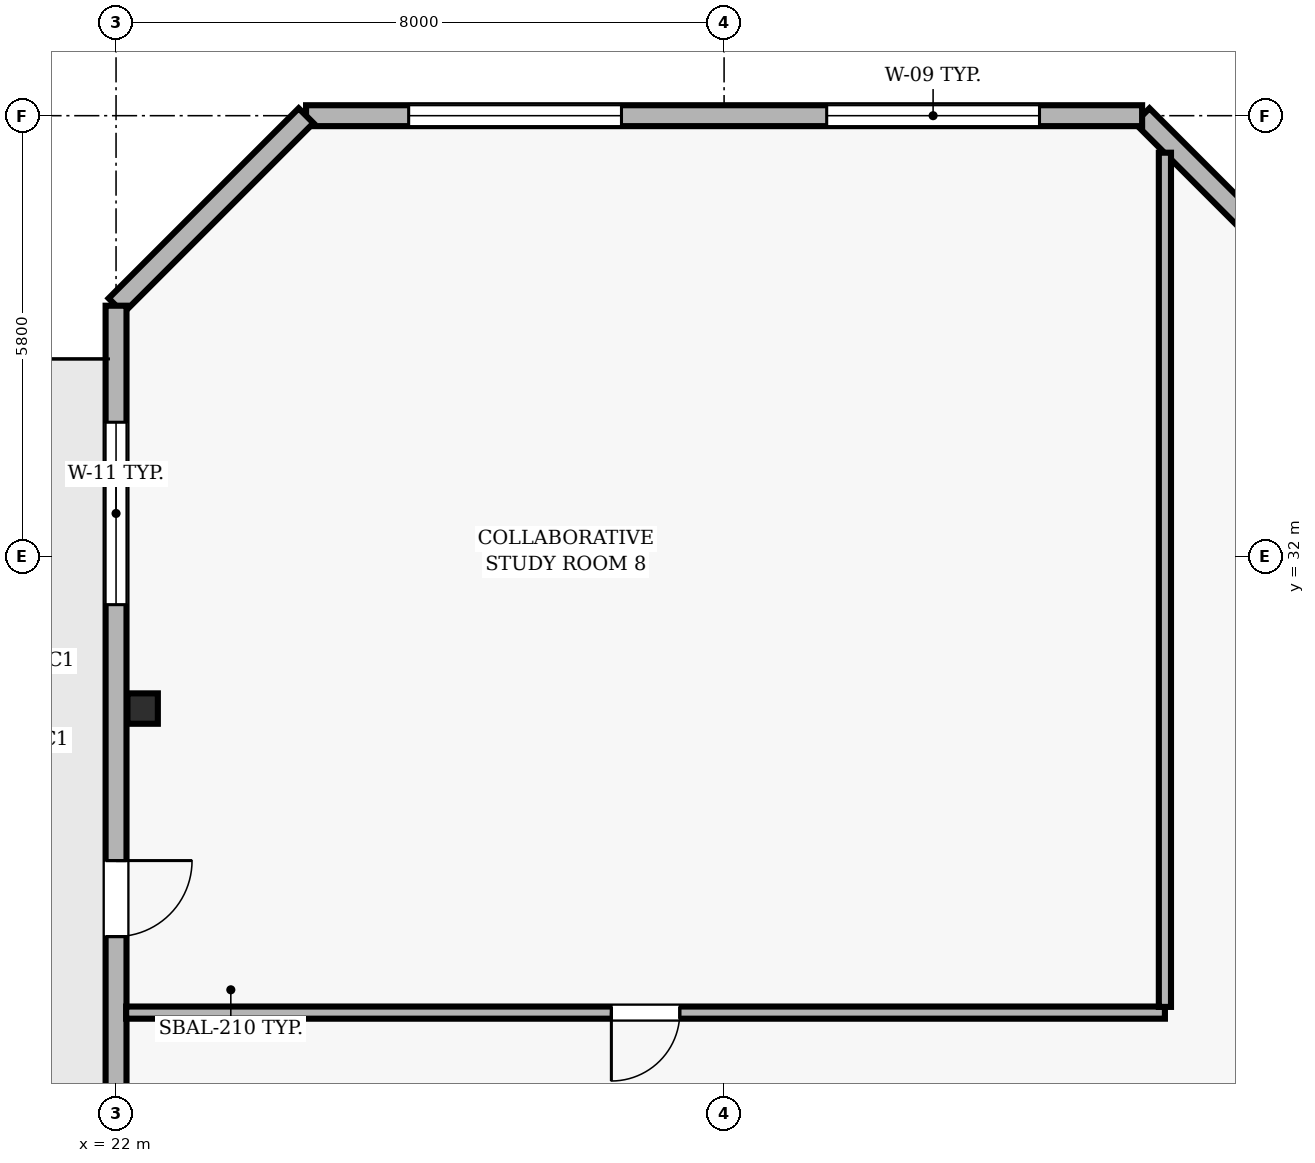
"""IFC4 building model, lengths in metres.
Left out: names, types, materials, properties, quantities, classifications, styles, units other than length and angle.
Written with IfcOpenShell. Run it as: python <this file> out.ifc"""

import sys

from ifc_helpers import new_model, si_unit, direction, frame, frame_2d, origin, origin_2d, place, context, subcontext, project, spatial, rectangle, hollow_rectangle, extrude, element, fill, save


model = new_model("IFC4")
c1 = context("Model", 3, precision=1e-05, world=origin(), true_north=direction((0.0, 1.0)))
c2 = subcontext(c1, "Body", "Model", "MODEL_VIEW")
j1 = project(units=[si_unit("LENGTHUNIT", "METRE"), si_unit("PLANEANGLEUNIT", "RADIAN")], contexts=[c1])
p1 = place(None, origin())
s1 = spatial("IfcSite", under=j1, at=p1, CompositionType="ELEMENT")
p2 = place(p1, origin())
s2 = spatial("IfcBuilding", under=s1, at=p2, CompositionType="ELEMENT")
p3 = place(p2, frame((0.0, 0.0, 287.2)))
s3 = spatial("IfcBuildingStorey", under=s2, at=p3, CompositionType="ELEMENT", Elevation=287.2)
p4 = place(p3, frame((22.35, 30.0, 0.0), z_axis=(0.0, 0.0, 1.0), x_axis=(1.0, 0.0, 0.0)))
e1 = element("IfcColumn", 1, at=p4, inside=s3, PredefinedType="COLUMN", context=c2, shape_type="SweptSolid", body=[
    extrude(hollow_rectangle(XDim=0.4, YDim=0.4, WallThickness=0.02, at=origin_2d()), origin(), (0.0, 0.0, 1.0), 3.9),
])
p5 = place(p3, frame((38.0, 35.3, 0.0), z_axis=(0.0, 0.0, 1.0), x_axis=(-0.707106781187, 0.707106781187, 0.0)))
e2 = element("IfcWall", 2, at=p5, inside=s3, PredefinedType="SOLIDWALL", context=c2, shape_type="SweptSolid", body=[
    extrude(rectangle(XDim=3.536, YDim=0.275, at=frame_2d((1.768, 0.0))), origin(), (0.0, 0.0, 1.0), 3.69),
])
p6 = place(p3, frame((35.5, 37.8, 0.0), z_axis=(0.0, 0.0, 1.0), x_axis=(-1.0, 0.0, 0.0)))
e3 = element("IfcWall", 3, at=p6, inside=s3, PredefinedType="SOLIDWALL", context=c2, shape_type="SweptSolid", body=[
    extrude(rectangle(XDim=11.0, YDim=0.275, at=frame_2d((5.5, 0.0))), origin(), (0.0, 0.0, 1.0), 3.69),
])
p7 = place(p6, frame((1.35, 0.0, 0.9)))
e4 = element("IfcOpeningElement", 4, at=p7, cuts=e3, PredefinedType="OPENING", context=c2, shape_type="SweptSolid", body=[
    extrude(rectangle(XDim=2.8, YDim=1.8, at=frame_2d((1.4, 0.9))), frame((0.0, 0.147, 0.0), z_axis=(0.0, -1.0, 0.0), x_axis=(1.0, 0.0, 0.0)), (0.0, 0.0, 1.0), 0.295),
])
p8 = place(p6, frame((6.85, 0.0, 0.9)))
e5 = element("IfcOpeningElement", 5, at=p8, cuts=e3, PredefinedType="OPENING", context=c2, shape_type="SweptSolid", body=[
    extrude(rectangle(XDim=2.8, YDim=1.8, at=frame_2d((1.4, 0.9))), frame((0.0, 0.147, 0.0), z_axis=(0.0, -1.0, 0.0), x_axis=(1.0, 0.0, 0.0)), (0.0, 0.0, 1.0), 0.295),
])
p9 = place(p3, frame((24.5, 37.8, 0.0), z_axis=(0.0, 0.0, 1.0), x_axis=(-0.707106781187, -0.707106781187, 0.0)))
e6 = element("IfcWall", 6, at=p9, inside=s3, PredefinedType="SOLIDWALL", context=c2, shape_type="SweptSolid", body=[
    extrude(rectangle(XDim=3.536, YDim=0.275, at=frame_2d((1.768, 0.0))), origin(), (0.0, 0.0, 1.0), 3.69),
])
p10 = place(p3, frame((22.0, 35.3, 0.0), z_axis=(0.0, 0.0, 1.0), x_axis=(0.0, -1.0, 0.0)))
e7 = element("IfcWall", 7, at=p10, inside=s3, PredefinedType="SOLIDWALL", context=c2, shape_type="SweptSolid", body=[
    extrude(rectangle(XDim=32.8, YDim=0.275, at=frame_2d((16.4, 0.0))), origin(), (0.0, 0.0, 1.0), 3.69),
])
p11 = place(p10, frame((7.3, 0.0, 0.0)))
e8 = element("IfcOpeningElement", 8, at=p11, cuts=e7, PredefinedType="OPENING", context=c2, shape_type="SweptSolid", body=[
    extrude(rectangle(XDim=1.0, YDim=2.2, at=frame_2d((0.5, 1.1))), frame((0.0, 0.147, 0.0), z_axis=(0.0, -1.0, 0.0), x_axis=(1.0, 0.0, 0.0)), (0.0, 0.0, 1.0), 0.295),
])
p12 = place(p10, frame((1.533, 0.0, 0.9)))
e9 = element("IfcOpeningElement", 9, at=p12, cuts=e7, PredefinedType="OPENING", context=c2, shape_type="SweptSolid", body=[
    extrude(rectangle(XDim=2.4, YDim=2.2, at=frame_2d((1.2, 1.1))), frame((0.0, 0.147, 0.0), z_axis=(0.0, -1.0, 0.0), x_axis=(1.0, 0.0, 0.0)), (0.0, 0.0, 1.0), 0.295),
])
p13 = place(p10, frame((12.917, 0.0, 0.9)))
e10 = element("IfcOpeningElement", 10, at=p13, cuts=e7, PredefinedType="OPENING", context=c2, shape_type="SweptSolid", body=[
    extrude(rectangle(XDim=2.4, YDim=2.2, at=frame_2d((1.2, 1.1))), frame((0.0, 0.147, 0.0), z_axis=(0.0, -1.0, 0.0), x_axis=(1.0, 0.0, 0.0)), (0.0, 0.0, 1.0), 0.295),
])
p14 = place(p10, frame((17.483, 0.0, 0.9)))
e11 = element("IfcOpeningElement", 11, at=p14, cuts=e7, PredefinedType="OPENING", context=c2, shape_type="SweptSolid", body=[
    extrude(rectangle(XDim=2.4, YDim=2.2, at=frame_2d((1.2, 1.1))), frame((0.0, 0.147, 0.0), z_axis=(0.0, -1.0, 0.0), x_axis=(1.0, 0.0, 0.0)), (0.0, 0.0, 1.0), 0.295),
])
p15 = place(p10, frame((23.4, 0.0, 0.9)))
e12 = element("IfcOpeningElement", 12, at=p15, cuts=e7, PredefinedType="OPENING", context=c2, shape_type="SweptSolid", body=[
    extrude(rectangle(XDim=2.4, YDim=2.2, at=frame_2d((1.2, 1.1))), frame((0.0, 0.147, 0.0), z_axis=(0.0, -1.0, 0.0), x_axis=(1.0, 0.0, 0.0)), (0.0, 0.0, 1.0), 0.295),
])
p16 = place(p3, frame((35.8, 26.0, 0.0), z_axis=(0.0, 0.0, 1.0), x_axis=(-1.0, 0.0, 0.0)))
e13 = element("IfcWall", 13, at=p16, inside=s3, PredefinedType="PARTITIONING", context=c2, shape_type="SweptSolid", body=[
    extrude(rectangle(XDim=13.667, YDim=0.16, at=frame_2d((6.833, 0.0))), origin(), (0.0, 0.0, 1.0), 3.69),
])
p17 = place(p16, frame((6.383, 0.0, 0.0)))
e14 = element("IfcOpeningElement", 14, at=p17, cuts=e13, PredefinedType="OPENING", context=c2, shape_type="SweptSolid", body=[
    extrude(rectangle(XDim=0.9, YDim=2.1, at=frame_2d((0.45, 1.05))), frame((0.0, 0.09, 0.0), z_axis=(0.0, -1.0, 0.0), x_axis=(1.0, 0.0, 0.0)), (0.0, 0.0, 1.0), 0.18),
])
p18 = place(p3, frame((35.8, 37.313, 0.0), z_axis=(0.0, 0.0, 1.0), x_axis=(0.0, -1.0, 0.0)))
e15 = element("IfcWall", 15, at=p18, inside=s3, PredefinedType="PARTITIONING", context=c2, shape_type="SweptSolid", body=[
    extrude(rectangle(XDim=11.238, YDim=0.16, at=frame_2d((5.619, 0.0))), origin(), (0.0, 0.0, 1.0), 3.69),
])
p19 = place(p7, origin())
e16 = element("IfcWindow", 16, at=p19, inside=s3, PartitioningType="SINGLE_PANEL", PredefinedType="WINDOW", context=c2, shape_type="SweptSolid", body=[
    extrude(rectangle(XDim=2.8, YDim=1.8, at=frame_2d((1.4, 0.9))), frame((0.0, 0.03, 0.0), z_axis=(0.0, -1.0, 0.0), x_axis=(1.0, 0.0, 0.0)), (0.0, 0.0, 1.0), 0.06),
])
fill(e4, e16)
p20 = place(p8, origin())
e17 = element("IfcWindow", 17, at=p20, inside=s3, PartitioningType="SINGLE_PANEL", PredefinedType="WINDOW", context=c2, shape_type="SweptSolid", body=[
    extrude(rectangle(XDim=2.8, YDim=1.8, at=frame_2d((1.4, 0.9))), frame((0.0, 0.03, 0.0), z_axis=(0.0, -1.0, 0.0), x_axis=(1.0, 0.0, 0.0)), (0.0, 0.0, 1.0), 0.06),
])
fill(e5, e17)
p21 = place(p11, origin())
e18 = element("IfcDoor", 18, at=p21, inside=s3, OperationType="SINGLE_SWING_LEFT", PredefinedType="DOOR", context=c2, shape_type="SweptSolid", body=[
    extrude(rectangle(XDim=1.0, YDim=2.2, at=frame_2d((0.5, 1.1))), frame((0.0, 0.025, 0.0), z_axis=(0.0, -1.0, 0.0), x_axis=(1.0, 0.0, 0.0)), (0.0, 0.0, 1.0), 0.05),
])
fill(e8, e18)
p22 = place(p12, origin())
e19 = element("IfcWindow", 19, at=p22, inside=s3, PartitioningType="SINGLE_PANEL", PredefinedType="WINDOW", context=c2, shape_type="SweptSolid", body=[
    extrude(rectangle(XDim=2.4, YDim=2.2, at=frame_2d((1.2, 1.1))), frame((0.0, 0.03, 0.0), z_axis=(0.0, -1.0, 0.0), x_axis=(1.0, 0.0, 0.0)), (0.0, 0.0, 1.0), 0.06),
])
fill(e9, e19)
p23 = place(p17, origin())
e20 = element("IfcDoor", 20, at=p23, inside=s3, OperationType="SINGLE_SWING_RIGHT", PredefinedType="DOOR", context=c2, shape_type="SweptSolid", body=[
    extrude(rectangle(XDim=0.9, YDim=2.1, at=frame_2d((0.45, 1.05))), frame((0.0, 0.025, 0.0), z_axis=(0.0, -1.0, 0.0), x_axis=(1.0, 0.0, 0.0)), (0.0, 0.0, 1.0), 0.05),
])
fill(e14, e20)
save(model, sys.argv[1])
